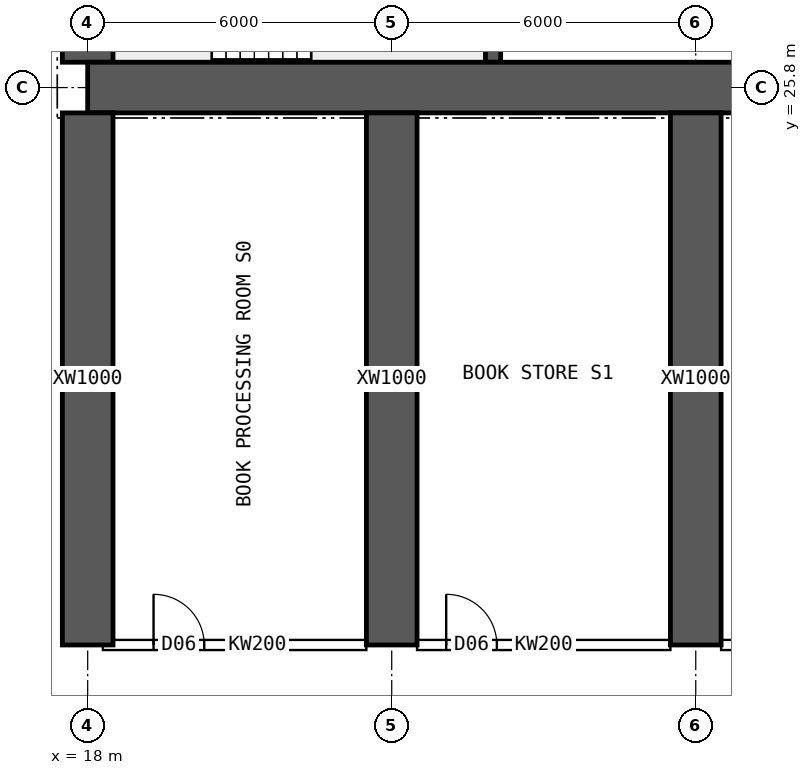
"""IFC4 building model, lengths in metres.
Left out: names, types, materials, properties, quantities, classifications, styles, units other than length and angle.
Written with IfcOpenShell. Run it as: python <this file> out.ifc"""

import sys

from ifc_helpers import new_model, si_unit, direction, frame, frame_2d, origin, place, context, subcontext, project, spatial, rectangle, extrude, element, fill, save


model = new_model("IFC4")
c1 = context("Model", 3, precision=1e-05, world=origin(), true_north=direction((0.0, 1.0)))
c2 = subcontext(c1, "Body", "Model", "MODEL_VIEW")
j1 = project(units=[si_unit("LENGTHUNIT", "METRE"), si_unit("PLANEANGLEUNIT", "RADIAN")], contexts=[c1])
p1 = place(None, origin())
s1 = spatial("IfcSite", under=j1, at=p1, CompositionType="ELEMENT")
p2 = place(p1, origin())
s2 = spatial("IfcBuilding", under=s1, at=p2, CompositionType="ELEMENT")
p3 = place(p2, frame((0.0, 0.0, 11.0)))
s3 = spatial("IfcBuildingStorey", under=s2, at=p3, CompositionType="ELEMENT", Elevation=11.0)
p4 = place(p3, frame((18.0, 25.8, 0.0), z_axis=(0.0, 0.0, 1.0), x_axis=(1.0, 0.0, 0.0)))
e1 = element("IfcWall", 1, at=p4, inside=s3, PredefinedType="SHEAR", context=c2, shape_type="SweptSolid", body=[
    extrude(rectangle(XDim=48.0, YDim=1.0, at=frame_2d((24.0, 0.0))), origin(), (0.0, 0.0, 1.0), 5.0),
])
p5 = place(p3, frame((18.0, 26.3, 0.0), z_axis=(0.0, 0.0, 1.0), x_axis=(0.0, 1.0, 0.0)))
e2 = element("IfcWall", 2, at=p5, inside=s3, PredefinedType="SHEAR", context=c2, shape_type="SweptSolid", body=[
    extrude(rectangle(XDim=11.4, YDim=1.0, at=frame_2d((5.7, 0.0))), origin(), (0.0, 0.0, 1.0), 5.0),
])
p6 = place(p5, frame((5.0, 0.0, 0.0)))
e3 = element("IfcOpeningElement", 3, at=p6, cuts=e2, PredefinedType="OPENING", context=c2, shape_type="SweptSolid", body=[
    extrude(rectangle(XDim=1.2, YDim=2.1, at=frame_2d((0.6, 1.05))), frame((0.0, 0.51, 0.0), z_axis=(0.0, -1.0, 0.0), x_axis=(1.0, 0.0, 0.0)), (0.0, 0.0, 1.0), 1.02),
])
p7 = place(p3, frame((26.0, 26.3, 0.0), z_axis=(0.0, 0.0, 1.0), x_axis=(0.0, 1.0, 0.0)))
e4 = element("IfcWall", 4, at=p7, inside=s3, PredefinedType="SHEAR", context=c2, shape_type="SweptSolid", body=[
    extrude(rectangle(XDim=3.95, YDim=0.3, at=frame_2d((1.975, 0.0))), origin(), (0.0, 0.0, 1.0), 5.0),
])
for number, where, z_axis, x_axis in (
    (5, (18.0, 14.8, 0.0), (0.0, 0.0, 1.0), (0.0, 1.0, 0.0)),
    (6, (24.0, 14.8, 0.0), (0.0, 0.0, 1.0), (0.0, 1.0, 0.0)),
    (7, (30.0, 14.8, 0.0), (0.0, 0.0, 1.0), (0.0, 1.0, 0.0)),
):
    element("IfcWall", number, at=place(p3, frame(where, z_axis=z_axis, x_axis=x_axis)), inside=s3, PredefinedType="SHEAR", context=c2, shape_type="SweptSolid", body=[
        extrude(rectangle(XDim=10.5, YDim=1.0, at=frame_2d((5.25, 0.0))), origin(), (0.0, 0.0, 1.0), 5.0),
    ])
p8 = place(p3, frame((18.3, 14.8, 0.0), z_axis=(0.0, 0.0, 1.0), x_axis=(1.0, 0.0, 0.0)))
e8 = element("IfcWall", 8, at=p8, inside=s3, PredefinedType="SOLIDWALL", context=c2, shape_type="SweptSolid", body=[
    extrude(rectangle(XDim=5.2, YDim=0.2, at=frame_2d((2.6, 0.0))), origin(), (0.0, 0.0, 1.0), 4.6),
])
p9 = place(p8, frame((1.0, 0.0, 0.0)))
e9 = element("IfcOpeningElement", 9, at=p9, cuts=e8, PredefinedType="OPENING", context=c2, shape_type="SweptSolid", body=[
    extrude(rectangle(XDim=1.0, YDim=2.1, at=frame_2d((0.5, 1.05))), frame((0.0, 0.11, 0.0), z_axis=(0.0, -1.0, 0.0), x_axis=(1.0, 0.0, 0.0)), (0.0, 0.0, 1.0), 0.22),
])
p10 = place(p3, frame((24.5, 14.8, 0.0), z_axis=(0.0, 0.0, 1.0), x_axis=(1.0, 0.0, 0.0)))
e10 = element("IfcWall", 10, at=p10, inside=s3, PredefinedType="SOLIDWALL", context=c2, shape_type="SweptSolid", body=[
    extrude(rectangle(XDim=5.0, YDim=0.2, at=frame_2d((2.5, 0.0))), origin(), (0.0, 0.0, 1.0), 4.6),
])
p11 = place(p10, frame((0.575, 0.0, 0.0)))
e11 = element("IfcOpeningElement", 11, at=p11, cuts=e10, PredefinedType="OPENING", context=c2, shape_type="SweptSolid", body=[
    extrude(rectangle(XDim=1.0, YDim=2.1, at=frame_2d((0.5, 1.05))), frame((0.0, 0.11, 0.0), z_axis=(0.0, -1.0, 0.0), x_axis=(1.0, 0.0, 0.0)), (0.0, 0.0, 1.0), 0.22),
])
p12 = place(p3, frame((30.5, 14.8, 0.0), z_axis=(0.0, 0.0, 1.0), x_axis=(1.0, 0.0, 0.0)))
e12 = element("IfcWall", 12, at=p12, inside=s3, PredefinedType="SOLIDWALL", context=c2, shape_type="SweptSolid", body=[
    extrude(rectangle(XDim=5.0, YDim=0.2, at=frame_2d((2.5, 0.0))), origin(), (0.0, 0.0, 1.0), 4.6),
])
p13 = place(p12, frame((0.8, 0.0, 0.0)))
e13 = element("IfcOpeningElement", 13, at=p13, cuts=e12, PredefinedType="OPENING", context=c2, shape_type="SweptSolid", body=[
    extrude(rectangle(XDim=1.0, YDim=2.1, at=frame_2d((0.5, 1.05))), frame((0.0, 0.11, 0.0), z_axis=(0.0, -1.0, 0.0), x_axis=(1.0, 0.0, 0.0)), (0.0, 0.0, 1.0), 0.22),
])
p14 = place(p9, origin())
e14 = element("IfcDoor", 14, at=p14, inside=s3, OperationType="SINGLE_SWING_LEFT", PredefinedType="DOOR", context=c2, shape_type="SweptSolid", body=[
    extrude(rectangle(XDim=1.0, YDim=2.1, at=frame_2d((0.5, 1.05))), frame((0.0, 0.025, 0.0), z_axis=(0.0, -1.0, 0.0), x_axis=(1.0, 0.0, 0.0)), (0.0, 0.0, 1.0), 0.05),
])
fill(e9, e14)
p15 = place(p11, origin())
e15 = element("IfcDoor", 15, at=p15, inside=s3, OperationType="SINGLE_SWING_LEFT", PredefinedType="DOOR", context=c2, shape_type="SweptSolid", body=[
    extrude(rectangle(XDim=1.0, YDim=2.1, at=frame_2d((0.5, 1.05))), frame((0.0, 0.025, 0.0), z_axis=(0.0, -1.0, 0.0), x_axis=(1.0, 0.0, 0.0)), (0.0, 0.0, 1.0), 0.05),
])
fill(e11, e15)
save(model, sys.argv[1])
